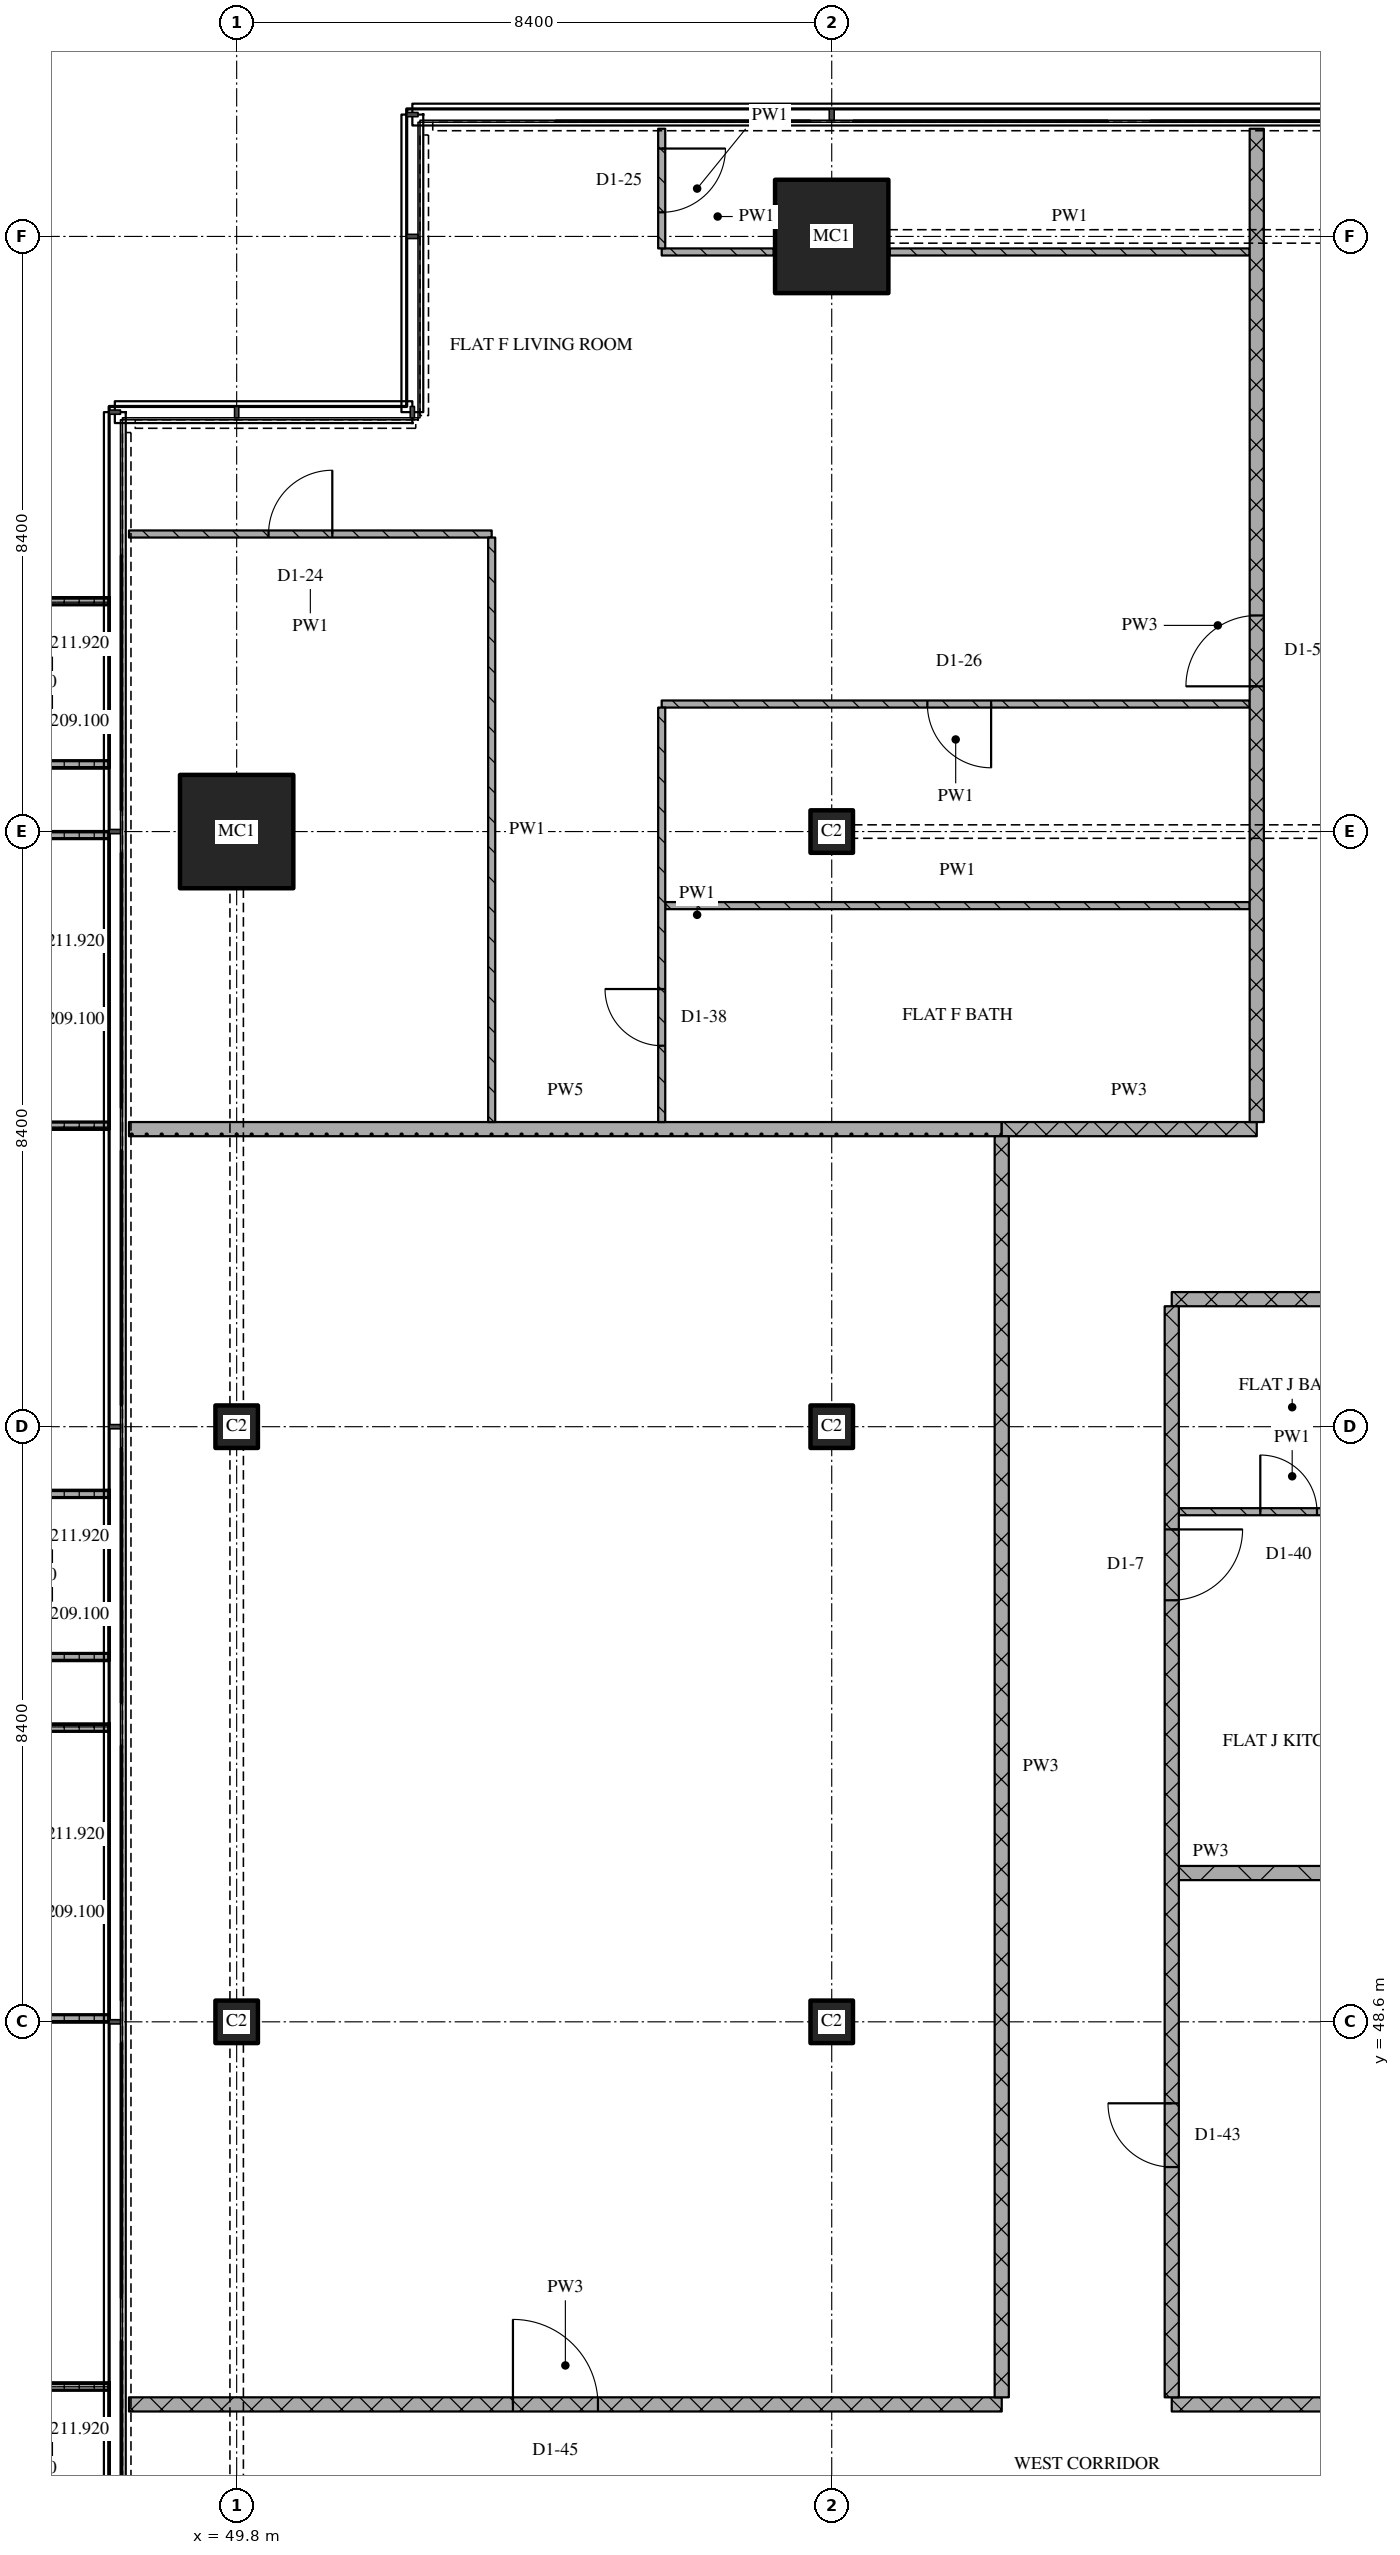
"""IFC4 building model, lengths in metres.
Left out: names, types, materials, properties, quantities, classifications, styles, units other than length and angle.
Written with IfcOpenShell. Run it as: python <this file> out.ifc"""

import sys

from ifc_helpers import new_model, si_unit, direction, frame, frame_2d, origin, origin_2d, place, context, subcontext, project, spatial, polyline, rectangle, outline, extrude, element, fill, save


model = new_model("IFC4")
c1 = context("Model", 3, precision=1e-05, world=origin(), true_north=direction((0.0, 1.0)))
c2 = subcontext(c1, "Body", "Model", "MODEL_VIEW")
j1 = project(units=[si_unit("LENGTHUNIT", "METRE"), si_unit("PLANEANGLEUNIT", "RADIAN")], contexts=[c1])
p1 = place(None, origin())
s1 = spatial("IfcSite", under=j1, at=p1, CompositionType="ELEMENT")
p2 = place(p1, origin())
s2 = spatial("IfcBuilding", under=s1, at=p2, CompositionType="ELEMENT")
p3 = place(p2, frame((0.0, 0.0, 209.1)))
s3 = spatial("IfcBuildingStorey", under=s2, at=p3, CompositionType="ELEMENT", Elevation=209.1)
for number, where, z_axis, x_axis in (
    (1, (49.8, 48.6, 0.0), (0.0, 0.0, 1.0), (1.0, 0.0, 0.0)),
    (2, (49.8, 57.0, 0.0), (0.0, 0.0, 1.0), (1.0, 0.0, 0.0)),
):
    element("IfcColumn", number, at=place(p3, frame(where, z_axis=z_axis, x_axis=x_axis)), inside=s3, PredefinedType="COLUMN", context=c2, shape_type="SweptSolid", body=[
        extrude(rectangle(XDim=0.6, YDim=0.6, at=origin_2d()), origin(), (0.0, 0.0, 1.0), 3.6),
    ])
p4 = place(p3, frame((49.8, 65.4, 0.0), z_axis=(0.0, 0.0, 1.0), x_axis=(1.0, 0.0, 0.0)))
e3 = element("IfcColumn", 3, at=p4, inside=s3, PredefinedType="COLUMN", context=c2, shape_type="SweptSolid", body=[
    extrude(rectangle(XDim=1.6, YDim=1.6, at=origin_2d()), origin(), (0.0, 0.0, 1.0), 3.6),
])
for number, where, z_axis, x_axis in (
    (4, (58.2, 48.6, 0.0), (0.0, 0.0, 1.0), (1.0, 0.0, 0.0)),
    (5, (58.2, 57.0, 0.0), (0.0, 0.0, 1.0), (1.0, 0.0, 0.0)),
    (6, (58.2, 65.4, 0.0), (0.0, 0.0, 1.0), (1.0, 0.0, 0.0)),
):
    element("IfcColumn", number, at=place(p3, frame(where, z_axis=z_axis, x_axis=x_axis)), inside=s3, PredefinedType="COLUMN", context=c2, shape_type="SweptSolid", body=[
        extrude(rectangle(XDim=0.6, YDim=0.6, at=origin_2d()), origin(), (0.0, 0.0, 1.0), 3.6),
    ])
p5 = place(p3, frame((58.2, 73.8, 0.0), z_axis=(0.0, 0.0, 1.0), x_axis=(1.0, 0.0, 0.0)))
e7 = element("IfcColumn", 7, at=p5, inside=s3, PredefinedType="COLUMN", context=c2, shape_type="SweptSolid", body=[
    extrude(rectangle(XDim=1.6, YDim=1.6, at=origin_2d()), origin(), (0.0, 0.0, 1.0), 3.6),
])
p6 = place(p3, origin())
e8 = element("IfcWall", 8, at=p6, inside=s3, PredefinedType="SOLIDWALL", context=c2, shape_type="SweptSolid", body=[
    extrude(outline(polyline([(48.0, 68.7), (48.0, 68.6), (46.5, 68.6), (46.5, 66.4), (48.0, 66.4), (48.0, 66.3), (46.4, 66.3), (46.4, 68.7), (48.0, 68.7)])), origin(), (0.0, 0.0, 1.0), 1.0),
])
p7 = place(p3, origin())
e9 = element("IfcWall", 9, at=p7, inside=s3, PredefinedType="SOLIDWALL", context=c2, shape_type="SweptSolid", body=[
    extrude(outline(polyline([(48.0, 65.4), (48.0, 65.3), (46.367, 65.3), (46.367, 61.3), (48.0, 61.3), (48.0, 61.2), (46.267, 61.2), (46.267, 65.4), (48.0, 65.4)])), origin(), (0.0, 0.0, 1.0), 1.0),
])
p8 = place(p3, origin())
e10 = element("IfcWall", 10, at=p8, inside=s3, PredefinedType="SOLIDWALL", context=c2, shape_type="SweptSolid", body=[
    extrude(outline(polyline([(48.0, 56.1), (48.0, 56.0), (46.5, 56.0), (46.5, 53.8), (48.0, 53.8), (48.0, 53.7), (46.4, 53.7), (46.4, 56.1), (48.0, 56.1)])), origin(), (0.0, 0.0, 1.0), 1.0),
])
p9 = place(p3, origin())
e11 = element("IfcWall", 11, at=p9, inside=s3, PredefinedType="SOLIDWALL", context=c2, shape_type="SweptSolid", body=[
    extrude(outline(polyline([(48.0, 52.8), (48.0, 52.7), (46.367, 52.7), (46.367, 48.7), (48.0, 48.7), (48.0, 48.6), (46.267, 48.6), (46.267, 52.8), (48.0, 52.8)])), origin(), (0.0, 0.0, 1.0), 1.0),
])
p10 = place(p3, origin())
e12 = element("IfcWall", 12, at=p10, inside=s3, PredefinedType="SOLIDWALL", context=c2, shape_type="SweptSolid", body=[
    extrude(outline(polyline([(48.0, 43.5), (48.0, 43.4), (46.5, 43.4), (46.5, 41.2), (48.0, 41.2), (48.0, 41.1), (46.4, 41.1), (46.4, 43.5), (48.0, 43.5)])), origin(), (0.0, 0.0, 1.0), 1.0),
])
p11 = place(p3, frame((48.28, 43.2, 0.0), z_axis=(0.0, 0.0, 1.0), x_axis=(1.0, 0.0, 0.0)))
e13 = element("IfcWall", 13, at=p11, inside=s3, PredefinedType="PARTITIONING", context=c2, shape_type="SweptSolid", body=[
    extrude(rectangle(XDim=12.32, YDim=0.2, at=frame_2d((6.16, 0.0))), origin(), (0.0, 0.0, 1.0), 3.32),
])
p12 = place(p11, frame((5.42, 0.0, 0.0)))
e14 = element("IfcOpeningElement", 14, at=p12, cuts=e13, PredefinedType="OPENING", context=c2, shape_type="SweptSolid", body=[
    extrude(rectangle(XDim=1.2, YDim=2.1, at=frame_2d((0.6, 1.05))), frame((0.0, 0.11, 0.0), z_axis=(0.0, -1.0, 0.0), x_axis=(1.0, 0.0, 0.0)), (0.0, 0.0, 1.0), 0.22),
])
p13 = place(p3, frame((63.0, 43.2, 0.0), z_axis=(0.0, 0.0, 1.0), x_axis=(1.0, 0.0, 0.0)))
e15 = element("IfcWall", 15, at=p13, inside=s3, PredefinedType="PARTITIONING", context=c2, shape_type="SweptSolid", body=[
    extrude(rectangle(XDim=5.2, YDim=0.2, at=frame_2d((2.6, 0.0))), origin(), (0.0, 0.0, 1.0), 3.32),
])
p14 = place(p3, frame((63.1, 50.7, 0.0), z_axis=(0.0, 0.0, 1.0), x_axis=(1.0, 0.0, 0.0)))
e16 = element("IfcWall", 16, at=p14, inside=s3, PredefinedType="PARTITIONING", context=c2, shape_type="SweptSolid", body=[
    extrude(rectangle(XDim=5.1, YDim=0.2, at=frame_2d((2.55, 0.0))), origin(), (0.0, 0.0, 1.0), 3.32),
])
p15 = place(p3, frame((63.1, 55.8, 0.0), z_axis=(0.0, 0.0, 1.0), x_axis=(1.0, 0.0, 0.0)))
e17 = element("IfcWall", 17, at=p15, inside=s3, PredefinedType="PARTITIONING", context=c2, shape_type="SweptSolid", body=[
    extrude(rectangle(XDim=3.2, YDim=0.1, at=frame_2d((1.6, 0.0))), origin(), (0.0, 0.0, 1.0), 3.32),
])
p16 = place(p15, frame((1.15, 0.0, 0.0)))
e18 = element("IfcOpeningElement", 18, at=p16, cuts=e17, PredefinedType="OPENING", context=c2, shape_type="SweptSolid", body=[
    extrude(rectangle(XDim=0.8, YDim=2.1, at=frame_2d((0.4, 1.05))), frame((0.0, 0.06, 0.0), z_axis=(0.0, -1.0, 0.0), x_axis=(1.0, 0.0, 0.0)), (0.0, 0.0, 1.0), 0.12),
])
p17 = place(p3, frame((63.0, 58.8, 0.0), z_axis=(0.0, 0.0, 1.0), x_axis=(1.0, 0.0, 0.0)))
e19 = element("IfcWall", 19, at=p17, inside=s3, PredefinedType="PARTITIONING", context=c2, shape_type="SweptSolid", body=[
    extrude(rectangle(XDim=10.8, YDim=0.2, at=frame_2d((5.4, 0.0))), origin(), (0.0, 0.0, 1.0), 3.32),
])
p18 = place(p3, frame((60.6, 61.2, 0.0), z_axis=(0.0, 0.0, 1.0), x_axis=(1.0, 0.0, 0.0)))
e20 = element("IfcWall", 20, at=p18, inside=s3, PredefinedType="PARTITIONING", context=c2, shape_type="SweptSolid", body=[
    extrude(rectangle(XDim=3.6, YDim=0.2, at=frame_2d((1.8, 0.0))), origin(), (0.0, 0.0, 1.0), 3.32),
])
p19 = place(p3, frame((48.28, 61.2, 0.0), z_axis=(0.0, 0.0, 1.0), x_axis=(1.0, 0.0, 0.0)))
e21 = element("IfcWall", 21, at=p19, inside=s3, PredefinedType="PARTITIONING", context=c2, shape_type="SweptSolid", body=[
    extrude(rectangle(XDim=12.32, YDim=0.2, at=frame_2d((6.16, 0.0))), origin(), (0.0, 0.0, 1.0), 3.32),
])
p20 = place(p3, frame((55.85, 64.355, 0.0), z_axis=(0.0, 0.0, 1.0), x_axis=(1.0, 0.0, 0.0)))
e22 = element("IfcWall", 22, at=p20, inside=s3, PredefinedType="PARTITIONING", context=c2, shape_type="SweptSolid", body=[
    extrude(rectangle(XDim=8.25, YDim=0.1, at=frame_2d((4.125, 0.0))), origin(), (0.0, 0.0, 1.0), 3.32),
])
p21 = place(p3, frame((64.1, 67.2, 0.0), z_axis=(0.0, 0.0, 1.0), x_axis=(-1.0, 0.0, 0.0)))
e23 = element("IfcWall", 23, at=p21, inside=s3, PredefinedType="PARTITIONING", context=c2, shape_type="SweptSolid", body=[
    extrude(rectangle(XDim=8.3, YDim=0.1, at=frame_2d((4.15, 0.0))), origin(), (0.0, 0.0, 1.0), 3.32),
])
p22 = place(p21, frame((3.65, 0.0, 0.0)))
e24 = element("IfcOpeningElement", 24, at=p22, cuts=e23, PredefinedType="OPENING", context=c2, shape_type="SweptSolid", body=[
    extrude(rectangle(XDim=0.9, YDim=2.1, at=frame_2d((0.45, 1.05))), frame((0.0, 0.06, 0.0), z_axis=(0.0, -1.0, 0.0), x_axis=(1.0, 0.0, 0.0)), (0.0, 0.0, 1.0), 0.12),
])
p23 = place(p3, frame((53.4, 69.6, 0.0), z_axis=(0.0, 0.0, 1.0), x_axis=(-1.0, 0.0, 0.0)))
e25 = element("IfcWall", 25, at=p23, inside=s3, PredefinedType="PARTITIONING", context=c2, shape_type="SweptSolid", body=[
    extrude(rectangle(XDim=5.12, YDim=0.1, at=frame_2d((2.56, 0.0))), origin(), (0.0, 0.0, 1.0), 3.32),
])
p24 = place(p23, frame((2.25, 0.0, 0.0)))
e26 = element("IfcOpeningElement", 26, at=p24, cuts=e25, PredefinedType="OPENING", context=c2, shape_type="SweptSolid", body=[
    extrude(rectangle(XDim=0.9, YDim=2.1, at=frame_2d((0.45, 1.05))), frame((0.0, 0.06, 0.0), z_axis=(0.0, -1.0, 0.0), x_axis=(1.0, 0.0, 0.0)), (0.0, 0.0, 1.0), 0.12),
])
p25 = place(p3, frame((55.8, 73.581, 0.0), z_axis=(0.0, 0.0, 1.0), x_axis=(1.0, 0.0, 0.0)))
e27 = element("IfcWall", 27, at=p25, inside=s3, PredefinedType="PARTITIONING", context=c2, shape_type="SweptSolid", body=[
    extrude(rectangle(XDim=1.58, YDim=0.1, at=frame_2d((0.79, 0.0))), origin(), (0.0, 0.0, 1.0), 3.32),
])
p26 = place(p3, frame((59.02, 73.581, 0.0), z_axis=(0.0, 0.0, 1.0), x_axis=(1.0, 0.0, 0.0)))
e28 = element("IfcWall", 28, at=p26, inside=s3, PredefinedType="PARTITIONING", context=c2, shape_type="SweptSolid", body=[
    extrude(rectangle(XDim=5.08, YDim=0.1, at=frame_2d((2.54, 0.0))), origin(), (0.0, 0.0, 1.0), 3.32),
])
p27 = place(p3, frame((53.4, 69.55, 0.0), z_axis=(0.0, 0.0, 1.0), x_axis=(0.0, -1.0, 0.0)))
e29 = element("IfcWall", 29, at=p27, inside=s3, PredefinedType="PARTITIONING", context=c2, shape_type="SweptSolid", body=[
    extrude(rectangle(XDim=8.25, YDim=0.1, at=frame_2d((4.125, 0.0))), origin(), (0.0, 0.0, 1.0), 3.32),
])
p28 = place(p3, frame((55.8, 67.15, 0.0), z_axis=(0.0, 0.0, 1.0), x_axis=(0.0, -1.0, 0.0)))
e30 = element("IfcWall", 30, at=p28, inside=s3, PredefinedType="PARTITIONING", context=c2, shape_type="SweptSolid", body=[
    extrude(rectangle(XDim=5.85, YDim=0.1, at=frame_2d((2.925, 0.0))), origin(), (0.0, 0.0, 1.0), 3.32),
])
p29 = place(p28, frame((3.973, 0.0, 0.0)))
e31 = element("IfcOpeningElement", 31, at=p29, cuts=e30, PredefinedType="OPENING", context=c2, shape_type="SweptSolid", body=[
    extrude(rectangle(XDim=0.8, YDim=2.1, at=frame_2d((0.4, 1.05))), frame((0.0, 0.06, 0.0), z_axis=(0.0, -1.0, 0.0), x_axis=(1.0, 0.0, 0.0)), (0.0, 0.0, 1.0), 0.12),
])
p30 = place(p3, frame((55.8, 75.32, 0.0), z_axis=(0.0, 0.0, 1.0), x_axis=(0.0, -1.0, 0.0)))
e32 = element("IfcWall", 32, at=p30, inside=s3, PredefinedType="PARTITIONING", context=c2, shape_type="SweptSolid", body=[
    extrude(rectangle(XDim=1.689, YDim=0.1, at=frame_2d((0.844, 0.0))), origin(), (0.0, 0.0, 1.0), 3.32),
])
p31 = place(p30, frame((0.28, 0.0, 0.0)))
e33 = element("IfcOpeningElement", 33, at=p31, cuts=e32, PredefinedType="OPENING", context=c2, shape_type="SweptSolid", body=[
    extrude(rectangle(XDim=0.9, YDim=2.1, at=frame_2d((0.45, 1.05))), frame((0.0, 0.06, 0.0), z_axis=(0.0, -1.0, 0.0), x_axis=(1.0, 0.0, 0.0)), (0.0, 0.0, 1.0), 0.12),
])
p32 = place(p3, frame((60.6, 61.1, 0.0), z_axis=(0.0, 0.0, 1.0), x_axis=(0.0, -1.0, 0.0)))
e34 = element("IfcWall", 34, at=p32, inside=s3, PredefinedType="PARTITIONING", context=c2, shape_type="SweptSolid", body=[
    extrude(rectangle(XDim=17.8, YDim=0.2, at=frame_2d((8.9, 0.0))), origin(), (0.0, 0.0, 1.0), 3.32),
])
p33 = place(p3, frame((63.0, 58.7, 0.0), z_axis=(0.0, 0.0, 1.0), x_axis=(0.0, -1.0, 0.0)))
e35 = element("IfcWall", 35, at=p33, inside=s3, PredefinedType="PARTITIONING", context=c2, shape_type="SweptSolid", body=[
    extrude(rectangle(XDim=15.4, YDim=0.2, at=frame_2d((7.7, 0.0))), origin(), (0.0, 0.0, 1.0), 3.32),
])
p34 = place(p33, frame((3.15, 0.0, 0.0)))
e36 = element("IfcOpeningElement", 36, at=p34, cuts=e35, PredefinedType="OPENING", context=c2, shape_type="SweptSolid", body=[
    extrude(rectangle(XDim=1.0, YDim=2.1, at=frame_2d((0.5, 1.05))), frame((0.0, 0.11, 0.0), z_axis=(0.0, -1.0, 0.0), x_axis=(1.0, 0.0, 0.0)), (0.0, 0.0, 1.0), 0.22),
])
p35 = place(p33, frame((11.25, 0.0, 0.0)))
e37 = element("IfcOpeningElement", 37, at=p35, cuts=e35, PredefinedType="OPENING", context=c2, shape_type="SweptSolid", body=[
    extrude(rectangle(XDim=0.9, YDim=2.1, at=frame_2d((0.45, 1.05))), frame((0.0, 0.11, 0.0), z_axis=(0.0, -1.0, 0.0), x_axis=(1.0, 0.0, 0.0)), (0.0, 0.0, 1.0), 0.22),
])
p36 = place(p3, frame((64.2, 61.3, 0.0), z_axis=(0.0, 0.0, 1.0), x_axis=(0.0, 1.0, 0.0)))
e38 = element("IfcWall", 38, at=p36, inside=s3, PredefinedType="PARTITIONING", context=c2, shape_type="SweptSolid", body=[
    extrude(rectangle(XDim=14.02, YDim=0.2, at=frame_2d((7.01, 0.0))), origin(), (0.0, 0.0, 1.0), 3.32),
])
p37 = place(p36, frame((6.15, 0.0, 0.0)))
e39 = element("IfcOpeningElement", 39, at=p37, cuts=e38, PredefinedType="OPENING", context=c2, shape_type="SweptSolid", body=[
    extrude(rectangle(XDim=1.0, YDim=2.1, at=frame_2d((0.5, 1.05))), frame((0.0, 0.11, 0.0), z_axis=(0.0, -1.0, 0.0), x_axis=(1.0, 0.0, 0.0)), (0.0, 0.0, 1.0), 0.22),
])
p38 = place(p12, origin())
e40 = element("IfcDoor", 40, at=p38, inside=s3, OperationType="SINGLE_SWING_LEFT", PredefinedType="DOOR", context=c2, shape_type="SweptSolid", body=[
    extrude(rectangle(XDim=1.2, YDim=2.1, at=frame_2d((0.6, 1.05))), frame((0.0, 0.025, 0.0), z_axis=(0.0, -1.0, 0.0), x_axis=(1.0, 0.0, 0.0)), (0.0, 0.0, 1.0), 0.05),
])
fill(e14, e40)
p39 = place(p16, origin())
e41 = element("IfcDoor", 41, at=p39, inside=s3, OperationType="SINGLE_SWING_LEFT", PredefinedType="DOOR", context=c2, shape_type="SweptSolid", body=[
    extrude(rectangle(XDim=0.8, YDim=2.1, at=frame_2d((0.4, 1.05))), frame((0.0, 0.025, 0.0), z_axis=(0.0, -1.0, 0.0), x_axis=(1.0, 0.0, 0.0)), (0.0, 0.0, 1.0), 0.05),
])
fill(e18, e41)
p40 = place(p22, origin())
e42 = element("IfcDoor", 42, at=p40, inside=s3, OperationType="SINGLE_SWING_LEFT", PredefinedType="DOOR", context=c2, shape_type="SweptSolid", body=[
    extrude(rectangle(XDim=0.9, YDim=2.1, at=frame_2d((0.45, 1.05))), frame((0.0, 0.025, 0.0), z_axis=(0.0, -1.0, 0.0), x_axis=(1.0, 0.0, 0.0)), (0.0, 0.0, 1.0), 0.05),
])
fill(e24, e42)
p41 = place(p24, origin())
e43 = element("IfcDoor", 43, at=p41, inside=s3, OperationType="SINGLE_SWING_RIGHT", PredefinedType="DOOR", context=c2, shape_type="SweptSolid", body=[
    extrude(rectangle(XDim=0.9, YDim=2.1, at=frame_2d((0.45, 1.05))), frame((0.0, 0.025, 0.0), z_axis=(0.0, -1.0, 0.0), x_axis=(1.0, 0.0, 0.0)), (0.0, 0.0, 1.0), 0.05),
])
fill(e26, e43)
p42 = place(p29, origin())
e44 = element("IfcDoor", 44, at=p42, inside=s3, OperationType="SINGLE_SWING_RIGHT", PredefinedType="DOOR", context=c2, shape_type="SweptSolid", body=[
    extrude(rectangle(XDim=0.8, YDim=2.1, at=frame_2d((0.4, 1.05))), frame((0.0, 0.025, 0.0), z_axis=(0.0, -1.0, 0.0), x_axis=(1.0, 0.0, 0.0)), (0.0, 0.0, 1.0), 0.05),
])
fill(e31, e44)
p43 = place(p31, origin())
e45 = element("IfcDoor", 45, at=p43, inside=s3, OperationType="SINGLE_SWING_LEFT", PredefinedType="DOOR", context=c2, shape_type="SweptSolid", body=[
    extrude(rectangle(XDim=0.9, YDim=2.1, at=frame_2d((0.45, 1.05))), frame((0.0, 0.025, 0.0), z_axis=(0.0, -1.0, 0.0), x_axis=(1.0, 0.0, 0.0)), (0.0, 0.0, 1.0), 0.05),
])
fill(e33, e45)
p44 = place(p34, origin())
e46 = element("IfcDoor", 46, at=p44, inside=s3, OperationType="SINGLE_SWING_LEFT", PredefinedType="DOOR", context=c2, shape_type="SweptSolid", body=[
    extrude(rectangle(XDim=1.0, YDim=2.1, at=frame_2d((0.5, 1.05))), frame((0.0, 0.025, 0.0), z_axis=(0.0, -1.0, 0.0), x_axis=(1.0, 0.0, 0.0)), (0.0, 0.0, 1.0), 0.05),
])
fill(e36, e46)
p45 = place(p35, origin())
e47 = element("IfcDoor", 47, at=p45, inside=s3, OperationType="SINGLE_SWING_RIGHT", PredefinedType="DOOR", context=c2, shape_type="SweptSolid", body=[
    extrude(rectangle(XDim=0.9, YDim=2.1, at=frame_2d((0.45, 1.05))), frame((0.0, 0.025, 0.0), z_axis=(0.0, -1.0, 0.0), x_axis=(1.0, 0.0, 0.0)), (0.0, 0.0, 1.0), 0.05),
])
fill(e37, e47)
p46 = place(p37, origin())
e48 = element("IfcDoor", 48, at=p46, inside=s3, OperationType="SINGLE_SWING_LEFT", PredefinedType="DOOR", context=c2, shape_type="SweptSolid", body=[
    extrude(rectangle(XDim=1.0, YDim=2.1, at=frame_2d((0.5, 1.05))), frame((0.0, 0.025, 0.0), z_axis=(0.0, -1.0, 0.0), x_axis=(1.0, 0.0, 0.0)), (0.0, 0.0, 1.0), 0.05),
])
fill(e39, e48)
save(model, sys.argv[1])
